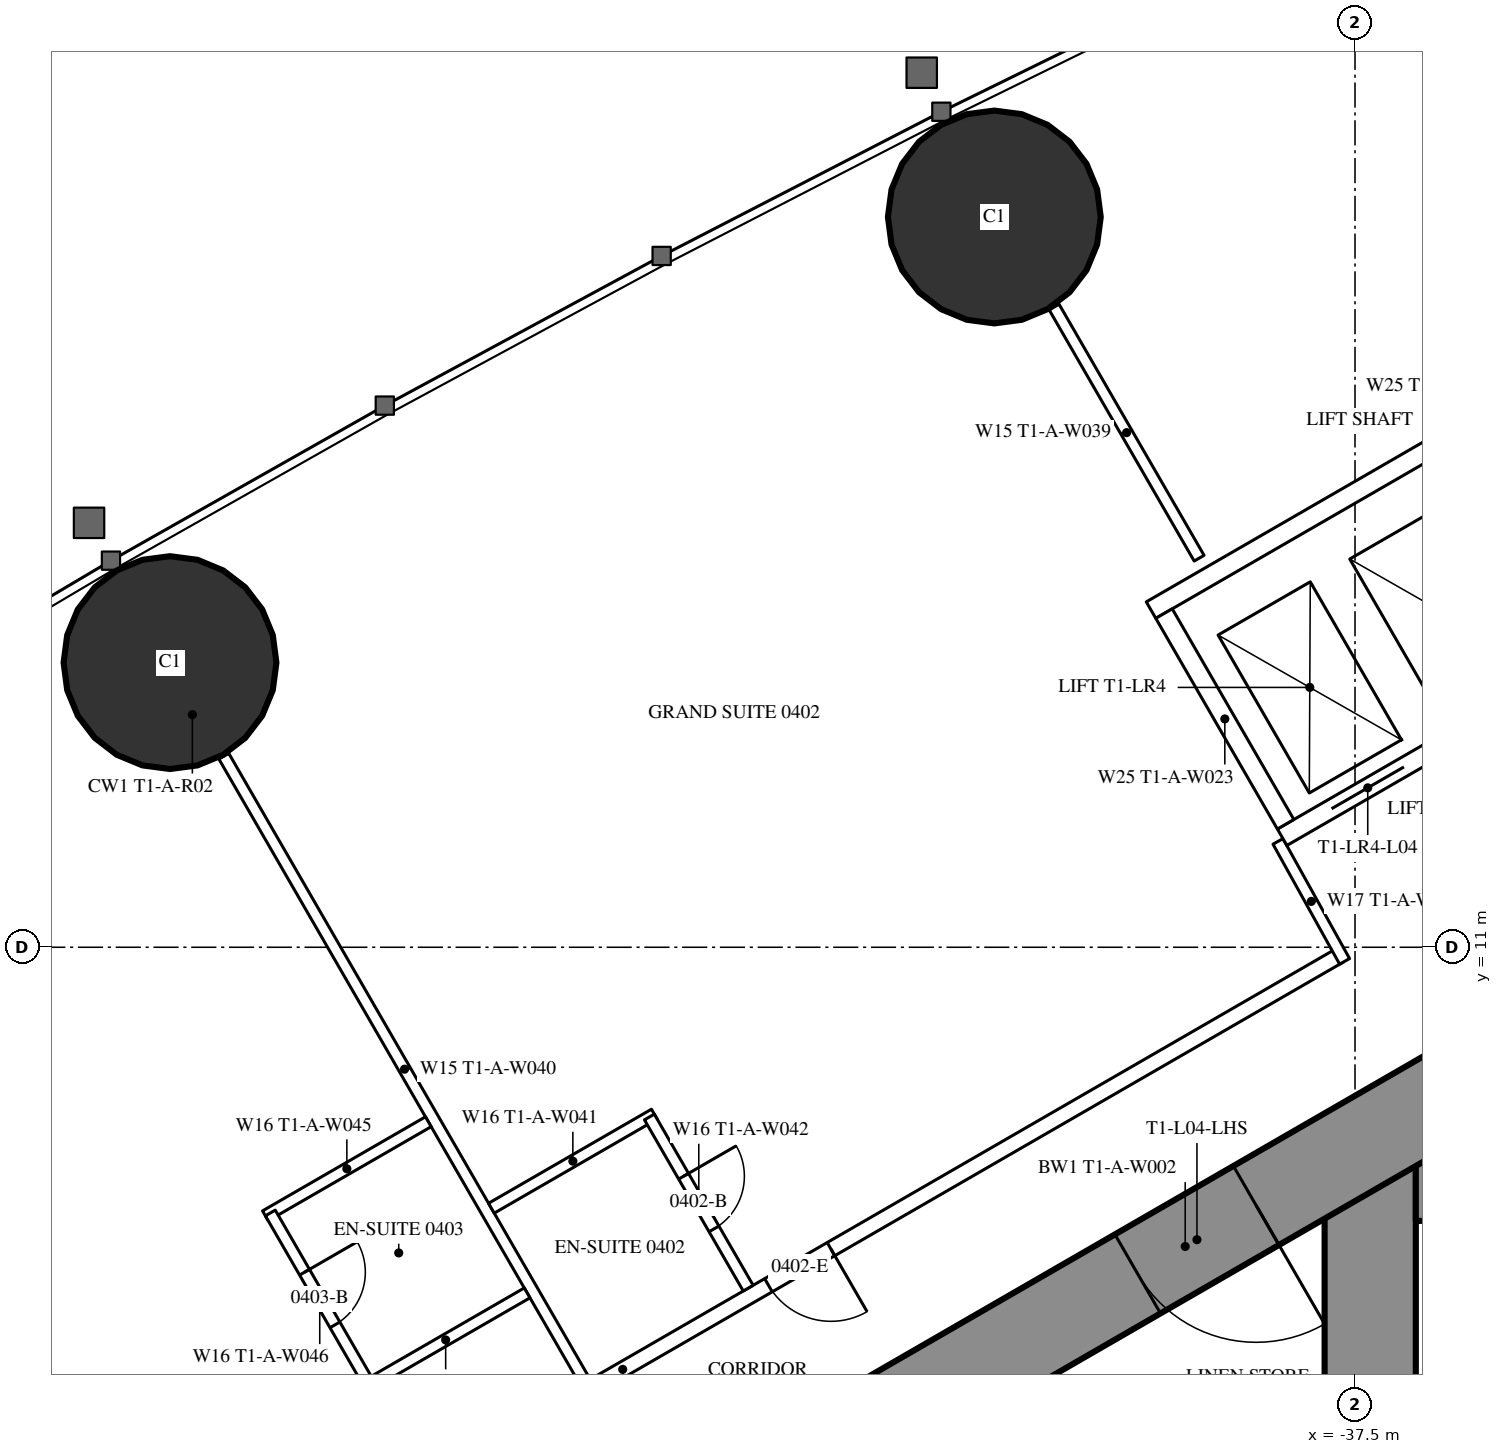
"""IFC4 building model, lengths in metres.
Left out: names, types, materials, properties, quantities, classifications, styles, units other than length and angle.
Written with IfcOpenShell. Run it as: python <this file> out.ifc"""

import sys

from ifc_helpers import new_model, si_unit, direction, frame, frame_2d, origin, origin_2d, place, context, subcontext, project, spatial, rectangle, hollow_circle, extrude, element, fill, save


model = new_model("IFC4")
c1 = context("Model", 3, precision=1e-05, world=origin(), true_north=direction((0.0, 1.0)))
c2 = subcontext(c1, "Body", "Model", "MODEL_VIEW")
j1 = project(units=[si_unit("LENGTHUNIT", "METRE"), si_unit("PLANEANGLEUNIT", "RADIAN")], contexts=[c1])
p1 = place(None, origin())
s1 = spatial("IfcSite", under=j1, at=p1, CompositionType="ELEMENT")
p2 = place(p1, origin())
s2 = spatial("IfcBuilding", under=s1, at=p2, CompositionType="ELEMENT")
p3 = place(p2, frame((0.0, 0.0, 21.5)))
s3 = spatial("IfcBuildingStorey", under=s2, at=p3, CompositionType="ELEMENT", Elevation=21.5)
for number, where, z_axis, x_axis in (
    (1, (-42.245, 20.607, 0.0), (0.0, 0.0, 1.0), (1.0, 0.0, 0.0)),
    (2, (-53.09, 14.745, 0.0), (0.0, 0.0, 1.0), (1.0, 0.0, 0.0)),
):
    element("IfcColumn", number, at=place(p3, frame(where, z_axis=z_axis, x_axis=x_axis)), inside=s3, PredefinedType="COLUMN", context=c2, shape_type="SweptSolid", body=[
        extrude(hollow_circle(Radius=1.4, WallThickness=0.12, at=origin_2d()), origin(), (0.0, 0.0, 1.0), 3.5),
    ])
p4 = place(p3, frame((-37.3, 8.6, 0.0), z_axis=(0.0, 0.0, 1.0), x_axis=(0.0, -1.0, 0.0)))
e3 = element("IfcWall", 3, at=p4, inside=s3, PredefinedType="SHEAR", context=c2, shape_type="SweptSolid", body=[
    extrude(rectangle(XDim=17.2, YDim=1.2, at=frame_2d((8.6, 0.0))), origin(), (0.0, 0.0, 1.0), 3.5),
])
p5 = place(p4, frame((7.7, 0.0, 0.0)))
e4 = element("IfcOpeningElement", 4, at=p5, cuts=e3, PredefinedType="OPENING", context=c2, shape_type="SweptSolid", body=[
    extrude(rectangle(XDim=1.8, YDim=2.2, at=frame_2d((0.9, 1.1))), frame((0.0, 0.61, 0.0), z_axis=(0.0, -1.0, 0.0), x_axis=(1.0, 0.0, 0.0)), (0.0, 0.0, 1.0), 1.22),
])
p6 = place(p3, frame((-28.3, 8.0, 0.0), z_axis=(0.0, 0.0, 1.0), x_axis=(-1.0, 0.0, 0.0)))
e5 = element("IfcWall", 5, at=p6, inside=s3, PredefinedType="SHEAR", context=c2, shape_type="SweptSolid", body=[
    extrude(rectangle(XDim=8.4, YDim=1.2, at=frame_2d((4.2, 0.0))), origin(), (0.0, 0.0, 1.0), 3.5),
])
p7 = place(p6, frame((0.25, 0.0, 0.0)))
e6 = element("IfcOpeningElement", 6, at=p7, cuts=e5, PredefinedType="OPENING", context=c2, shape_type="SweptSolid", body=[
    extrude(rectangle(XDim=1.0, YDim=2.2, at=frame_2d((0.5, 1.1))), frame((0.0, 0.61, 0.0), z_axis=(0.0, -1.0, 0.0), x_axis=(1.0, 0.0, 0.0)), (0.0, 0.0, 1.0), 1.22),
])
p8 = place(p3, frame((-27.2, 14.3, 0.0), z_axis=(0.0, 0.0, 1.0), x_axis=(-0.866026593062, -0.499997940104, 0.0)))
e7 = element("IfcWall", 7, at=p8, inside=s3, PredefinedType="SHEAR", context=c2, shape_type="SweptSolid", body=[
    extrude(rectangle(XDim=28.946, YDim=1.2, at=frame_2d((14.473, 0.0))), origin(), (0.0, 0.0, 1.0), 3.5),
])
p9 = place(p8, frame((4.6, 0.0, 0.0)))
e8 = element("IfcOpeningElement", 8, at=p9, cuts=e7, PredefinedType="OPENING", context=c2, shape_type="SweptSolid", body=[
    extrude(rectangle(XDim=1.0, YDim=2.2, at=frame_2d((0.5, 1.1))), frame((0.0, 0.61, 0.0), z_axis=(0.0, -1.0, 0.0), x_axis=(1.0, 0.0, 0.0)), (0.0, 0.0, 1.0), 1.22),
])
p10 = place(p8, frame((13.395, 0.0, 0.0)))
e9 = element("IfcOpeningElement", 9, at=p10, cuts=e7, PredefinedType="OPENING", context=c2, shape_type="SweptSolid", body=[
    extrude(rectangle(XDim=1.8, YDim=2.2, at=frame_2d((0.9, 1.1))), frame((0.0, 0.61, 0.0), z_axis=(0.0, -1.0, 0.0), x_axis=(1.0, 0.0, 0.0)), (0.0, 0.0, 1.0), 1.22),
])
p11 = place(p3, frame((-47.627, 5.278, 0.0), z_axis=(0.0, 0.0, 1.0), x_axis=(-0.500009844318, 0.86601972009, 0.0)))
e10 = element("IfcWall", 10, at=p11, inside=s3, PredefinedType="PARTITIONING", context=c2, shape_type="SweptSolid", body=[
    extrude(rectangle(XDim=9.51, YDim=0.15, at=frame_2d((4.755, 0.0))), origin(), (0.0, 0.0, 1.0), 2.25),
])
p12 = place(p3, frame((-39.551, 16.119, 0.0), z_axis=(0.0, 0.0, 1.0), x_axis=(-0.500014214979, 0.866017196607, 0.0)))
e11 = element("IfcWall", 11, at=p12, inside=s3, PredefinedType="PARTITIONING", context=c2, shape_type="SweptSolid", body=[
    extrude(rectangle(XDim=3.815, YDim=0.15, at=frame_2d((1.907, 0.0))), origin(), (0.0, 0.0, 1.0), 3.25),
])
p13 = place(p3, frame((-37.7, 10.894, 0.0), z_axis=(0.0, 0.0, 1.0), x_axis=(-0.866027905338, -0.499995667157, 0.0)))
e12 = element("IfcWall", 12, at=p13, inside=s3, PredefinedType="PARTITIONING", context=c2, shape_type="SweptSolid", body=[
    extrude(rectangle(XDim=21.787, YDim=0.2, at=frame_2d((10.894, 0.0))), origin(), (0.0, 0.0, 1.0), 3.25),
])
p14 = place(p13, frame((11.78, 0.0, 0.0)))
e13 = element("IfcOpeningElement", 13, at=p14, cuts=e12, PredefinedType="OPENING", context=c2, shape_type="SweptSolid", body=[
    extrude(rectangle(XDim=0.95, YDim=2.2, at=frame_2d((0.475, 1.1))), frame((0.0, 0.11, 0.0), z_axis=(0.0, -1.0, 0.0), x_axis=(1.0, 0.0, 0.0)), (0.0, 0.0, 1.0), 0.22),
])
p15 = place(p13, frame((7.73, 0.0, 0.0)))
e14 = element("IfcOpeningElement", 14, at=p15, cuts=e12, PredefinedType="OPENING", context=c2, shape_type="SweptSolid", body=[
    extrude(rectangle(XDim=0.95, YDim=2.2, at=frame_2d((0.475, 1.1))), frame((0.0, 0.11, 0.0), z_axis=(0.0, -1.0, 0.0), x_axis=(1.0, 0.0, 0.0)), (0.0, 0.0, 1.0), 0.22),
])
p16 = place(p3, frame((-38.513, 12.392, 0.0), z_axis=(0.0, 0.0, 1.0), x_axis=(0.485585508183, -0.874189175317, 0.0)))
e15 = element("IfcWall", 15, at=p16, inside=s3, PredefinedType="PARTITIONING", context=c2, shape_type="SweptSolid", body=[
    extrude(rectangle(XDim=1.805, YDim=0.15, at=frame_2d((0.902, 0.0))), origin(), (0.0, 0.0, 1.0), 3.25),
])
p17 = place(p3, frame((-49.692, 8.704, 0.0), z_axis=(0.0, 0.0, 1.0), x_axis=(-0.866073894602, -0.499916002032, 0.0)))
e16 = element("IfcWall", 16, at=p17, inside=s3, PredefinedType="PARTITIONING", context=c2, shape_type="SweptSolid", body=[
    extrude(rectangle(XDim=2.475, YDim=0.15, at=frame_2d((1.238, 0.0))), origin(), (0.0, 0.0, 1.0), 3.25),
])
p18 = place(p3, frame((-50.47, 5.253, 0.0), z_axis=(0.0, 0.0, 1.0), x_axis=(-0.500006934395, 0.866021400173, 0.0)))
e17 = element("IfcWall", 17, at=p18, inside=s3, PredefinedType="PARTITIONING", context=c2, shape_type="SweptSolid", body=[
    extrude(rectangle(XDim=2.6, YDim=0.15, at=frame_2d((1.3, 0.0))), origin(), (0.0, 0.0, 1.0), 3.25),
])
p19 = place(p18, frame((0.9, 0.0, 0.0)))
e18 = element("IfcOpeningElement", 18, at=p19, cuts=e17, PredefinedType="OPENING", context=c2, shape_type="SweptSolid", body=[
    extrude(rectangle(XDim=0.8, YDim=2.2, at=frame_2d((0.4, 1.1))), frame((0.0, 0.085, 0.0), z_axis=(0.0, -1.0, 0.0), x_axis=(1.0, 0.0, 0.0)), (0.0, 0.0, 1.0), 0.17),
])
for number, where, z_axis, x_axis in (
    (19, (-48.392, 6.453, 0.0), (0.0, 0.0, 1.0), (-0.866, -0.5, 0.0)),
    (20, (-46.719, 8.804, 0.0), (0.0, 0.0, 1.0), (-0.866, -0.5, 0.0)),
):
    element("IfcWall", number, at=place(p3, frame(where, z_axis=z_axis, x_axis=x_axis)), inside=s3, PredefinedType="PARTITIONING", context=c2, shape_type="SweptSolid", body=[
        extrude(rectangle(XDim=2.475, YDim=0.15, at=frame_2d((1.237, 0.0))), origin(), (0.0, 0.0, 1.0), 3.25),
    ])
p20 = place(p3, frame((-45.483, 6.515, 0.0), z_axis=(0.0, 0.0, 1.0), x_axis=(-0.500006934395, 0.866021400173, 0.0)))
e21 = element("IfcWall", 21, at=p20, inside=s3, PredefinedType="PARTITIONING", context=c2, shape_type="SweptSolid", body=[
    extrude(rectangle(XDim=2.6, YDim=0.15, at=frame_2d((1.3, 0.0))), origin(), (0.0, 0.0, 1.0), 3.25),
])
p21 = place(p20, frame((0.9, 0.0, 0.0)))
e22 = element("IfcOpeningElement", 22, at=p21, cuts=e21, PredefinedType="OPENING", context=c2, shape_type="SweptSolid", body=[
    extrude(rectangle(XDim=0.8, YDim=2.2, at=frame_2d((0.4, 1.1))), frame((0.0, 0.085, 0.0), z_axis=(0.0, -1.0, 0.0), x_axis=(1.0, 0.0, 0.0)), (0.0, 0.0, 1.0), 0.17),
])
p22 = place(p3, frame((-31.01, 16.747, 0.0), z_axis=(0.0, 0.0, 1.0), x_axis=(-0.866028165386, -0.499995216735, 0.0)))
e23 = element("IfcWall", 23, at=p22, inside=s3, PredefinedType="PARTITIONING", context=c2, shape_type="SweptSolid", body=[
    extrude(rectangle(XDim=8.6, YDim=0.25, at=frame_2d((4.3, 0.0))), origin(), (0.0, 0.0, 1.0), 3.25),
])
p23 = place(p22, frame((0.75, 0.0, 0.0)))
e24 = element("IfcOpeningElement", 24, at=p23, cuts=e23, PredefinedType="OPENING", context=c2, shape_type="SweptSolid", body=[
    extrude(rectangle(XDim=1.1, YDim=2.2, at=frame_2d((0.55, 1.1))), frame((0.0, 0.135, 0.0), z_axis=(0.0, -1.0, 0.0), x_axis=(1.0, 0.0, 0.0)), (0.0, 0.0, 1.0), 0.27),
])
p24 = place(p22, frame((2.75, 0.0, 0.0)))
e25 = element("IfcOpeningElement", 25, at=p24, cuts=e23, PredefinedType="OPENING", context=c2, shape_type="SweptSolid", body=[
    extrude(rectangle(XDim=1.1, YDim=2.2, at=frame_2d((0.55, 1.1))), frame((0.0, 0.135, 0.0), z_axis=(0.0, -1.0, 0.0), x_axis=(1.0, 0.0, 0.0)), (0.0, 0.0, 1.0), 0.27),
])
p25 = place(p22, frame((4.75, 0.0, 0.0)))
e26 = element("IfcOpeningElement", 26, at=p25, cuts=e23, PredefinedType="OPENING", context=c2, shape_type="SweptSolid", body=[
    extrude(rectangle(XDim=1.1, YDim=2.2, at=frame_2d((0.55, 1.1))), frame((0.0, 0.135, 0.0), z_axis=(0.0, -1.0, 0.0), x_axis=(1.0, 0.0, 0.0)), (0.0, 0.0, 1.0), 0.27),
])
p26 = place(p22, frame((6.75, 0.0, 0.0)))
e27 = element("IfcOpeningElement", 27, at=p26, cuts=e23, PredefinedType="OPENING", context=c2, shape_type="SweptSolid", body=[
    extrude(rectangle(XDim=1.1, YDim=2.2, at=frame_2d((0.55, 1.1))), frame((0.0, 0.135, 0.0), z_axis=(0.0, -1.0, 0.0), x_axis=(1.0, 0.0, 0.0)), (0.0, 0.0, 1.0), 0.27),
])
p27 = place(p3, frame((-32.736, 19.736, 0.0), z_axis=(0.0, 0.0, 1.0), x_axis=(-0.866028165386, -0.499995216735, 0.0)))
e28 = element("IfcWall", 28, at=p27, inside=s3, PredefinedType="PARTITIONING", context=c2, shape_type="SweptSolid", body=[
    extrude(rectangle(XDim=8.6, YDim=0.25, at=frame_2d((4.3, 0.0))), origin(), (0.0, 0.0, 1.0), 3.25),
])
p28 = place(p3, frame((-38.413, 12.618, 0.0), z_axis=(0.0, 0.0, 1.0), x_axis=(-0.499872130319, 0.866099216793, 0.0)))
e29 = element("IfcWall", 29, at=p28, inside=s3, PredefinedType="PARTITIONING", context=c2, shape_type="SweptSolid", body=[
    extrude(rectangle(XDim=3.2, YDim=0.25, at=frame_2d((1.6, 0.0))), origin(), (0.0, 0.0, 1.0), 3.25),
])
p29 = place(p19, origin())
e30 = element("IfcDoor", 30, at=p29, inside=s3, OperationType="SINGLE_SWING_RIGHT", PredefinedType="DOOR", context=c2, shape_type="SweptSolid", body=[
    extrude(rectangle(XDim=0.8, YDim=2.2, at=frame_2d((0.4, 1.1))), frame((0.0, 0.025, 0.0), z_axis=(0.0, -1.0, 0.0), x_axis=(1.0, 0.0, 0.0)), (0.0, 0.0, 1.0), 0.05),
])
fill(e18, e30)
p30 = place(p21, origin())
e31 = element("IfcDoor", 31, at=p30, inside=s3, OperationType="SINGLE_SWING_RIGHT", PredefinedType="DOOR", context=c2, shape_type="SweptSolid", body=[
    extrude(rectangle(XDim=0.8, YDim=2.2, at=frame_2d((0.4, 1.1))), frame((0.0, 0.025, 0.0), z_axis=(0.0, -1.0, 0.0), x_axis=(1.0, 0.0, 0.0)), (0.0, 0.0, 1.0), 0.05),
])
fill(e22, e31)
p31 = place(p15, origin())
e32 = element("IfcDoor", 32, at=p31, inside=s3, OperationType="SINGLE_SWING_LEFT", PredefinedType="DOOR", context=c2, shape_type="SweptSolid", body=[
    extrude(rectangle(XDim=0.95, YDim=2.2, at=frame_2d((0.475, 1.1))), frame((0.0, 0.025, 0.0), z_axis=(0.0, -1.0, 0.0), x_axis=(1.0, 0.0, 0.0)), (0.0, 0.0, 1.0), 0.05),
])
fill(e14, e32)
p32 = place(p10, origin())
e33 = element("IfcDoor", 33, at=p32, inside=s3, OperationType="DOUBLE_DOOR_SINGLE_SWING", PredefinedType="DOOR", context=c2, shape_type="SweptSolid", body=[
    extrude(rectangle(XDim=1.8, YDim=2.2, at=frame_2d((0.9, 1.1))), frame((0.0, 0.025, 0.0), z_axis=(0.0, -1.0, 0.0), x_axis=(1.0, 0.0, 0.0)), (0.0, 0.0, 1.0), 0.05),
])
fill(e9, e33)
p33 = place(p26, origin())
e34 = element("IfcDoor", 34, at=p33, inside=s3, OperationType="DOUBLE_DOOR_SLIDING", PredefinedType="USERDEFINED", context=c2, shape_type="SweptSolid", body=[
    extrude(rectangle(XDim=1.1, YDim=2.2, at=frame_2d((0.55, 1.1))), frame((0.0, 0.025, 0.0), z_axis=(0.0, -1.0, 0.0), x_axis=(1.0, 0.0, 0.0)), (0.0, 0.0, 1.0), 0.05),
])
fill(e27, e34)
save(model, sys.argv[1])
